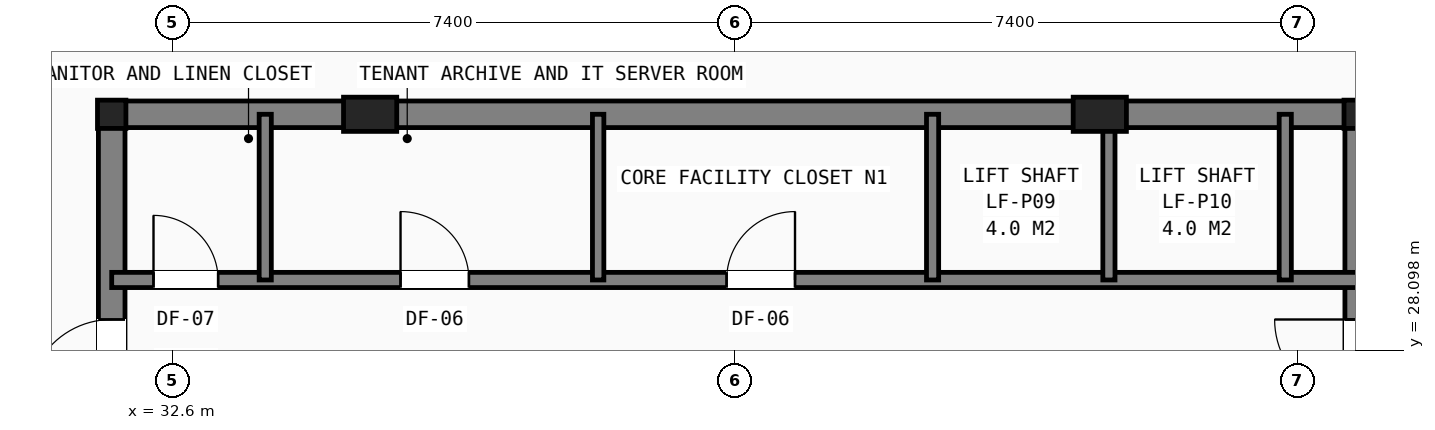
"""IFC4 building model, lengths in metres.
Left out: names, types, materials, properties, quantities, classifications, styles, units other than length and angle.
Written with IfcOpenShell. Run it as: python <this file> out.ifc"""

import sys

from ifc_helpers import new_model, si_unit, direction, frame, frame_2d, origin, origin_2d, place, context, subcontext, project, spatial, rectangle, i_section, extrude, element, fill, save


model = new_model("IFC4")
c1 = context("Model", 3, precision=1e-05, world=origin(), true_north=direction((0.0, 1.0)))
c2 = subcontext(c1, "Body", "Model", "MODEL_VIEW")
j1 = project(units=[si_unit("LENGTHUNIT", "METRE"), si_unit("PLANEANGLEUNIT", "RADIAN")], contexts=[c1])
p1 = place(None, origin())
s1 = spatial("IfcSite", under=j1, at=p1, CompositionType="ELEMENT")
p2 = place(p1, origin())
s2 = spatial("IfcBuilding", under=s1, at=p2, CompositionType="ELEMENT")
p3 = place(p2, frame((0.0, 0.0, 157.4)))
s3 = spatial("IfcBuildingStorey", under=s2, at=p3, CompositionType="ELEMENT", Elevation=157.4)
for number, where, z_axis, x_axis in (
    (1, (31.8, 31.2, 0.0), (0.0, 0.0, 1.0), (1.0, 0.0, 0.0)),
    (2, (48.2, 31.2, 0.0), (0.0, 0.0, 1.0), (1.0, 0.0, 0.0)),
):
    element("IfcColumn", number, at=place(p3, frame(where, z_axis=z_axis, x_axis=x_axis)), inside=s3, PredefinedType="COLUMN", context=c2, shape_type="SweptSolid", body=[
        extrude(i_section(OverallWidth=0.374, OverallDepth=0.372, WebThickness=0.016, FlangeThickness=0.026, at=origin_2d()), origin(), (0.0, 0.0, 1.0), 4.6),
    ])
for number, where, z_axis, x_axis in (
    (3, (35.2, 31.2, 0.0), (0.0, 0.0, 1.0), (1.0, 0.0, 0.0)),
    (4, (44.8, 31.2, 0.0), (0.0, 0.0, 1.0), (1.0, 0.0, 0.0)),
):
    element("IfcColumn", number, at=place(p3, frame(where, z_axis=z_axis, x_axis=x_axis)), inside=s3, PredefinedType="PILASTER", context=c2, shape_type="SweptSolid", body=[
        extrude(rectangle(XDim=0.7, YDim=0.45, at=origin_2d()), origin(), (0.0, 0.0, 1.0), 4.6),
    ])
p4 = place(p3, frame((31.8, 31.2, 0.0), z_axis=(0.0, 0.0, 1.0), x_axis=(1.0, 0.0, 0.0)))
e5 = element("IfcWall", 5, at=p4, inside=s3, PredefinedType="SHEAR", context=c2, shape_type="SweptSolid", body=[
    extrude(rectangle(XDim=16.4, YDim=0.35, at=frame_2d((8.2, 0.0))), origin(), (0.0, 0.0, 1.0), 4.36),
])
p5 = place(p3, frame((31.8, 16.4, 0.0), z_axis=(0.0, 0.0, 1.0), x_axis=(0.0, 1.0, 0.0)))
e6 = element("IfcWall", 6, at=p5, inside=s3, PredefinedType="SHEAR", context=c2, shape_type="SweptSolid", body=[
    extrude(rectangle(XDim=14.8, YDim=0.35, at=frame_2d((7.4, 0.0))), origin(), (0.0, 0.0, 1.0), 4.36),
])
p6 = place(p5, frame((11.0, 0.0, 0.0)))
e7 = element("IfcOpeningElement", 7, at=p6, cuts=e6, PredefinedType="OPENING", context=c2, shape_type="SweptSolid", body=[
    extrude(rectangle(XDim=1.1, YDim=2.15, at=frame_2d((0.55, 1.075))), frame((0.0, 0.185, 0.0), z_axis=(0.0, -1.0, 0.0), x_axis=(1.0, 0.0, 0.0)), (0.0, 0.0, 1.0), 0.37),
])
p7 = place(p5, frame((0.45, 0.0, 0.0)))
e8 = element("IfcOpeningElement", 8, at=p7, cuts=e6, PredefinedType="OPENING", context=c2, shape_type="SweptSolid", body=[
    extrude(rectangle(XDim=0.95, YDim=2.1, at=frame_2d((0.475, 1.05))), frame((0.0, 0.185, 0.0), z_axis=(0.0, -1.0, 0.0), x_axis=(1.0, 0.0, 0.0)), (0.0, 0.0, 1.0), 0.37),
])
p8 = place(p3, frame((48.2, 16.4, 0.0), z_axis=(0.0, 0.0, 1.0), x_axis=(0.0, 1.0, 0.0)))
e9 = element("IfcWall", 9, at=p8, inside=s3, PredefinedType="SHEAR", context=c2, shape_type="SweptSolid", body=[
    extrude(rectangle(XDim=14.8, YDim=0.35, at=frame_2d((7.4, 0.0))), origin(), (0.0, 0.0, 1.0), 4.36),
])
p9 = place(p8, frame((11.0, 0.0, 0.0)))
e10 = element("IfcOpeningElement", 10, at=p9, cuts=e9, PredefinedType="OPENING", context=c2, shape_type="SweptSolid", body=[
    extrude(rectangle(XDim=1.1, YDim=2.15, at=frame_2d((0.55, 1.075))), frame((0.0, 0.185, 0.0), z_axis=(0.0, -1.0, 0.0), x_axis=(1.0, 0.0, 0.0)), (0.0, 0.0, 1.0), 0.37),
])
p10 = place(p8, frame((0.45, 0.0, 0.0)))
e11 = element("IfcOpeningElement", 11, at=p10, cuts=e9, PredefinedType="OPENING", context=c2, shape_type="SweptSolid", body=[
    extrude(rectangle(XDim=0.95, YDim=2.1, at=frame_2d((0.475, 1.05))), frame((0.0, 0.185, 0.0), z_axis=(0.0, -1.0, 0.0), x_axis=(1.0, 0.0, 0.0)), (0.0, 0.0, 1.0), 0.37),
])
p11 = place(p3, frame((31.8, 29.02, 0.0), z_axis=(0.0, 0.0, 1.0), x_axis=(1.0, 0.0, 0.0)))
e12 = element("IfcWall", 12, at=p11, inside=s3, PredefinedType="SOLIDWALL", context=c2, shape_type="SweptSolid", body=[
    extrude(rectangle(XDim=16.4, YDim=0.2, at=frame_2d((8.2, 0.0))), origin(), (0.0, 0.0, 1.0), 3.811),
])
p12 = place(p11, frame((0.55, 0.0, 0.0)))
e13 = element("IfcOpeningElement", 13, at=p12, cuts=e12, PredefinedType="OPENING", context=c2, shape_type="SweptSolid", body=[
    extrude(rectangle(XDim=0.85, YDim=2.05, at=frame_2d((0.425, 1.025))), frame((0.0, 0.11, 0.0), z_axis=(0.0, -1.0, 0.0), x_axis=(1.0, 0.0, 0.0)), (0.0, 0.0, 1.0), 0.22),
])
p13 = place(p11, frame((3.8, 0.0, 0.0)))
e14 = element("IfcOpeningElement", 14, at=p13, cuts=e12, PredefinedType="OPENING", context=c2, shape_type="SweptSolid", body=[
    extrude(rectangle(XDim=0.9, YDim=2.1, at=frame_2d((0.45, 1.05))), frame((0.0, 0.11, 0.0), z_axis=(0.0, -1.0, 0.0), x_axis=(1.0, 0.0, 0.0)), (0.0, 0.0, 1.0), 0.22),
])
p14 = place(p11, frame((8.09, 0.0, 0.0)))
e15 = element("IfcOpeningElement", 15, at=p14, cuts=e12, PredefinedType="OPENING", context=c2, shape_type="SweptSolid", body=[
    extrude(rectangle(XDim=0.9, YDim=2.1, at=frame_2d((0.45, 1.05))), frame((0.0, 0.11, 0.0), z_axis=(0.0, -1.0, 0.0), x_axis=(1.0, 0.0, 0.0)), (0.0, 0.0, 1.0), 0.22),
])
p15 = place(p3, frame((33.82, 29.02, 0.0), z_axis=(0.0, 0.0, 1.0), x_axis=(0.0, 1.0, 0.0)))
e16 = element("IfcWall", 16, at=p15, inside=s3, PredefinedType="SOLIDWALL", context=c2, shape_type="SweptSolid", body=[
    extrude(rectangle(XDim=2.18, YDim=0.16, at=frame_2d((1.09, 0.0))), origin(), (0.0, 0.0, 1.0), 4.088),
])
p16 = place(p3, frame((38.2, 29.02, 0.0), z_axis=(0.0, 0.0, 1.0), x_axis=(0.0, 1.0, 0.0)))
e17 = element("IfcWall", 17, at=p16, inside=s3, PredefinedType="PARTITIONING", context=c2, shape_type="SweptSolid", body=[
    extrude(rectangle(XDim=2.18, YDim=0.15, at=frame_2d((1.09, 0.0))), origin(), (0.0, 0.0, 1.0), 4.088),
])
for number, where, z_axis, x_axis in (
    (18, (42.6, 29.02, 0.0), (0.0, 0.0, 1.0), (0.0, 1.0, 0.0)),
    (19, (44.92, 29.02, 0.0), (0.0, 0.0, 1.0), (0.0, 1.0, 0.0)),
    (20, (47.24, 29.02, 0.0), (0.0, 0.0, 1.0), (0.0, 1.0, 0.0)),
):
    element("IfcWall", number, at=place(p3, frame(where, z_axis=z_axis, x_axis=x_axis)), inside=s3, PredefinedType="SOLIDWALL", context=c2, shape_type="SweptSolid", body=[
        extrude(rectangle(XDim=2.18, YDim=0.16, at=frame_2d((1.09, 0.0))), origin(), (0.0, 0.0, 1.0), 4.088),
    ])
p17 = place(p12, origin())
e21 = element("IfcDoor", 21, at=p17, inside=s3, OperationType="SINGLE_SWING_LEFT", PredefinedType="DOOR", context=c2, shape_type="SweptSolid", body=[
    extrude(rectangle(XDim=0.85, YDim=2.05, at=frame_2d((0.425, 1.025))), frame((0.0, 0.025, 0.0), z_axis=(0.0, -1.0, 0.0), x_axis=(1.0, 0.0, 0.0)), (0.0, 0.0, 1.0), 0.05),
])
fill(e13, e21)
p18 = place(p6, origin())
e22 = element("IfcDoor", 22, at=p18, inside=s3, OperationType="SINGLE_SWING_LEFT", PredefinedType="DOOR", context=c2, shape_type="SweptSolid", body=[
    extrude(rectangle(XDim=1.1, YDim=2.15, at=frame_2d((0.55, 1.075))), frame((0.0, 0.025, 0.0), z_axis=(0.0, -1.0, 0.0), x_axis=(1.0, 0.0, 0.0)), (0.0, 0.0, 1.0), 0.05),
])
fill(e7, e22)
p19 = place(p13, origin())
e23 = element("IfcDoor", 23, at=p19, inside=s3, OperationType="SINGLE_SWING_LEFT", PredefinedType="DOOR", context=c2, shape_type="SweptSolid", body=[
    extrude(rectangle(XDim=0.9, YDim=2.1, at=frame_2d((0.45, 1.05))), frame((0.0, 0.025, 0.0), z_axis=(0.0, -1.0, 0.0), x_axis=(1.0, 0.0, 0.0)), (0.0, 0.0, 1.0), 0.05),
])
fill(e14, e23)
p20 = place(p14, origin())
e24 = element("IfcDoor", 24, at=p20, inside=s3, OperationType="SINGLE_SWING_RIGHT", PredefinedType="DOOR", context=c2, shape_type="SweptSolid", body=[
    extrude(rectangle(XDim=0.9, YDim=2.1, at=frame_2d((0.45, 1.05))), frame((0.0, 0.025, 0.0), z_axis=(0.0, -1.0, 0.0), x_axis=(1.0, 0.0, 0.0)), (0.0, 0.0, 1.0), 0.05),
])
fill(e15, e24)
save(model, sys.argv[1])
